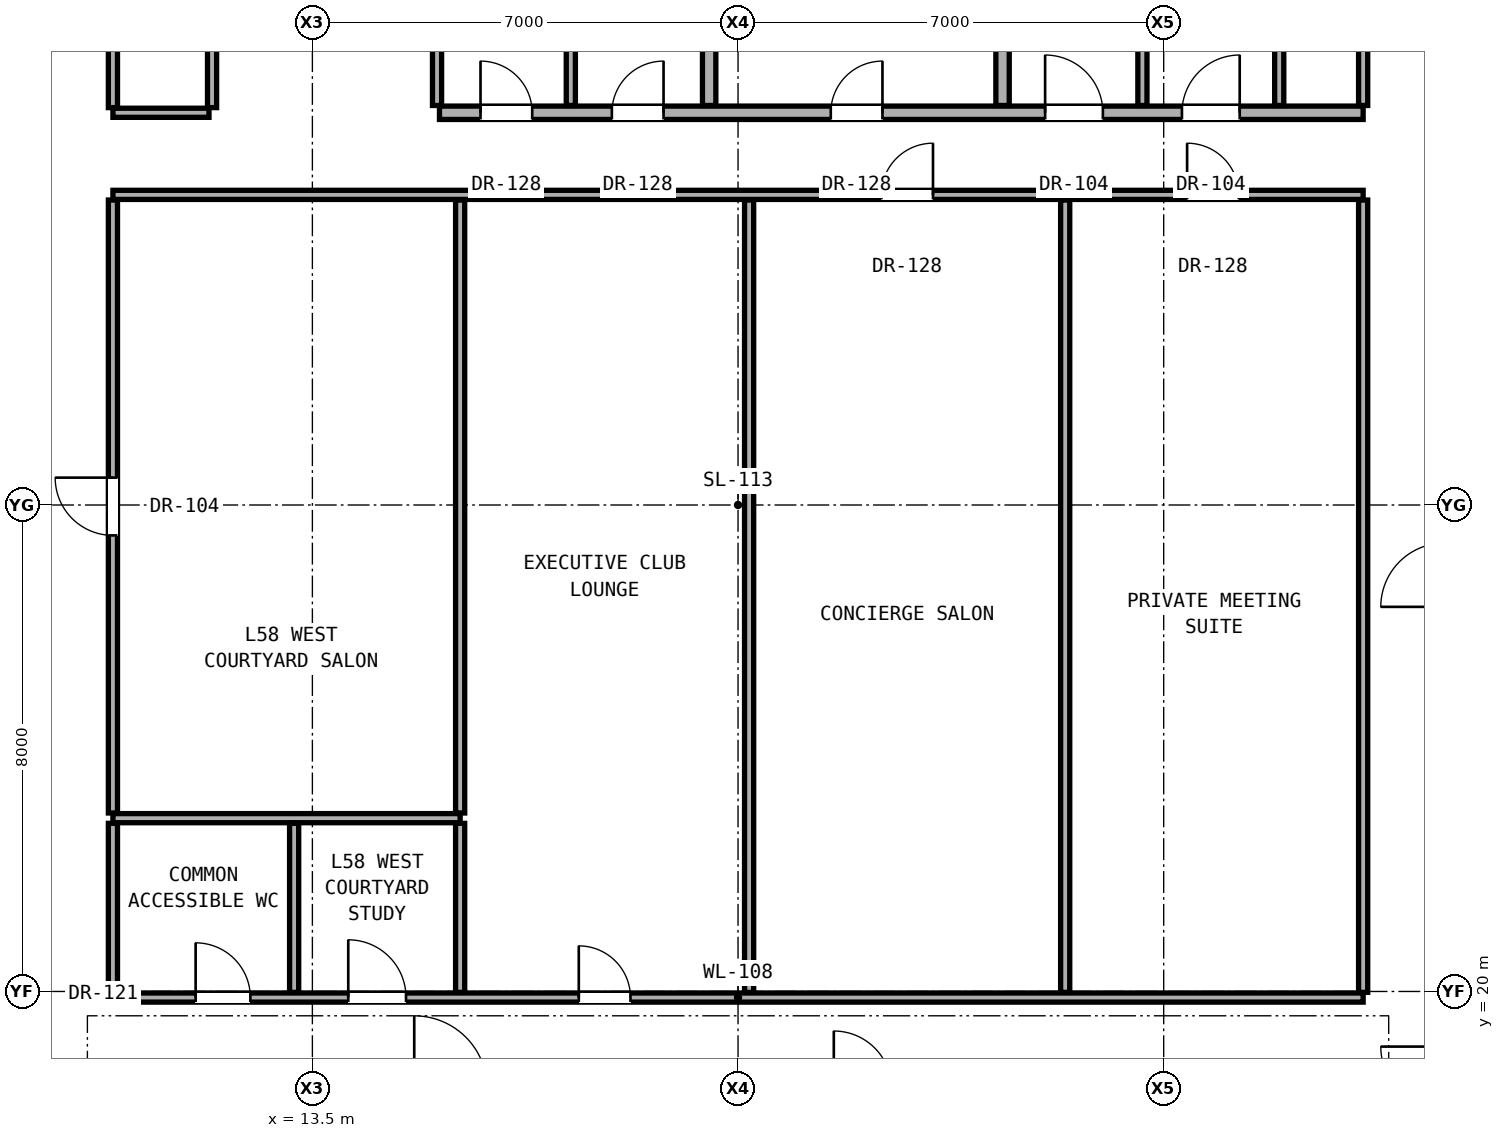
"""IFC4 building model, lengths in metres.
Left out: names, types, materials, properties, quantities, classifications, styles, units other than length and angle.
Written with IfcOpenShell. Run it as: python <this file> out.ifc"""

import sys

from ifc_helpers import new_model, si_unit, direction, frame, frame_2d, origin, place, context, subcontext, project, spatial, rectangle, extrude, element, fill, save


model = new_model("IFC4")
c1 = context("Model", 3, precision=1e-05, world=origin(), true_north=direction((0.0, 1.0)))
c2 = subcontext(c1, "Body", "Model", "MODEL_VIEW")
j1 = project(units=[si_unit("LENGTHUNIT", "METRE"), si_unit("PLANEANGLEUNIT", "RADIAN")], contexts=[c1])
p1 = place(None, origin())
s1 = spatial("IfcSite", under=j1, at=p1, CompositionType="ELEMENT")
p2 = place(p1, origin())
s2 = spatial("IfcBuilding", under=s1, at=p2, CompositionType="ELEMENT")
p3 = place(p2, frame((0.0, 0.0, 203.15)))
s3 = spatial("IfcBuildingStorey", under=s2, at=p3, CompositionType="ELEMENT", Elevation=203.15)
p4 = place(p3, frame((10.22, 19.9, 0.0), z_axis=(0.0, 0.0, 1.0), x_axis=(1.0, 0.0, 0.0)))
e1 = element("IfcWall", 1, at=p4, inside=s3, PredefinedType="PARTITIONING", context=c2, shape_type="SweptSolid", body=[
    extrude(rectangle(XDim=20.56, YDim=0.15, at=frame_2d((10.28, 0.0))), origin(), (0.0, 0.0, 1.0), 2.186),
])
p5 = place(p4, frame((1.36, 0.0, 0.0)))
e2 = element("IfcOpeningElement", 2, at=p5, cuts=e1, PredefinedType="OPENING", context=c2, shape_type="SweptSolid", body=[
    extrude(rectangle(XDim=0.9, YDim=2.1, at=frame_2d((0.45, 1.05))), frame((0.0, 0.085, 0.0), z_axis=(0.0, -1.0, 0.0), x_axis=(1.0, 0.0, 0.0)), (0.0, 0.0, 1.0), 0.17),
])
p6 = place(p4, frame((3.87, 0.0, 0.0)))
e3 = element("IfcOpeningElement", 3, at=p6, cuts=e1, PredefinedType="OPENING", context=c2, shape_type="SweptSolid", body=[
    extrude(rectangle(XDim=0.95, YDim=2.15, at=frame_2d((0.475, 1.075))), frame((0.0, 0.085, 0.0), z_axis=(0.0, -1.0, 0.0), x_axis=(1.0, 0.0, 0.0)), (0.0, 0.0, 1.0), 0.17),
])
p7 = place(p4, frame((7.661, 0.0, 0.0)))
e4 = element("IfcOpeningElement", 4, at=p7, cuts=e1, PredefinedType="OPENING", context=c2, shape_type="SweptSolid", body=[
    extrude(rectangle(XDim=0.85, YDim=2.01, at=frame_2d((0.425, 1.005))), frame((0.0, 0.085, 0.0), z_axis=(0.0, -1.0, 0.0), x_axis=(1.0, 0.0, 0.0)), (0.0, 0.0, 1.0), 0.17),
])
p8 = place(p3, frame((10.22, 22.85, 0.0), z_axis=(0.0, 0.0, 1.0), x_axis=(1.0, 0.0, 0.0)))
e5 = element("IfcWall", 5, at=p8, inside=s3, PredefinedType="PARTITIONING", context=c2, shape_type="SweptSolid", body=[
    extrude(rectangle(XDim=5.71, YDim=0.15, at=frame_2d((2.855, 0.0))), origin(), (0.0, 0.0, 1.0), 2.186),
])
p9 = place(p3, frame((10.22, 33.1, 0.0), z_axis=(0.0, 0.0, 1.0), x_axis=(1.0, 0.0, 0.0)))
e6 = element("IfcWall", 6, at=p9, inside=s3, PredefinedType="PARTITIONING", context=c2, shape_type="SweptSolid", body=[
    extrude(rectangle(XDim=20.56, YDim=0.15, at=frame_2d((10.28, 0.0))), origin(), (0.0, 0.0, 1.0), 2.186),
])
p10 = place(p9, frame((12.636, 0.0, 0.0)))
e7 = element("IfcOpeningElement", 7, at=p10, cuts=e6, PredefinedType="OPENING", context=c2, shape_type="SweptSolid", body=[
    extrude(rectangle(XDim=0.85, YDim=2.01, at=frame_2d((0.425, 1.005))), frame((0.0, 0.085, 0.0), z_axis=(0.0, -1.0, 0.0), x_axis=(1.0, 0.0, 0.0)), (0.0, 0.0, 1.0), 0.17),
])
p11 = place(p9, frame((17.665, 0.0, 0.0)))
e8 = element("IfcOpeningElement", 8, at=p11, cuts=e6, PredefinedType="OPENING", context=c2, shape_type="SweptSolid", body=[
    extrude(rectangle(XDim=0.85, YDim=2.01, at=frame_2d((0.425, 1.005))), frame((0.0, 0.085, 0.0), z_axis=(0.0, -1.0, 0.0), x_axis=(1.0, 0.0, 0.0)), (0.0, 0.0, 1.0), 0.17),
])
p12 = place(p3, frame((10.22, 34.45, 0.0), z_axis=(0.0, 0.0, 1.0), x_axis=(1.0, 0.0, 0.0)))
e9 = element("IfcWall", 9, at=p12, inside=s3, PredefinedType="PARTITIONING", context=c2, shape_type="SweptSolid", body=[
    extrude(rectangle(XDim=1.58, YDim=0.15, at=frame_2d((0.79, 0.0))), origin(), (0.0, 0.0, 1.0), 2.186),
])
p13 = place(p3, frame((15.59, 34.45, 0.0), z_axis=(0.0, 0.0, 1.0), x_axis=(1.0, 0.0, 0.0)))
e10 = element("IfcWall", 10, at=p13, inside=s3, PredefinedType="SOLIDWALL", context=c2, shape_type="SweptSolid", body=[
    extrude(rectangle(XDim=15.19, YDim=0.22, at=frame_2d((7.595, 0.0))), origin(), (0.0, 0.0, 1.0), 2.186),
])
p14 = place(p13, frame((6.435, 0.0, 0.0)))
e11 = element("IfcOpeningElement", 11, at=p14, cuts=e10, PredefinedType="OPENING", context=c2, shape_type="SweptSolid", body=[
    extrude(rectangle(XDim=0.85, YDim=2.01, at=frame_2d((0.425, 1.005))), frame((0.0, 0.12, 0.0), z_axis=(0.0, -1.0, 0.0), x_axis=(1.0, 0.0, 0.0)), (0.0, 0.0, 1.0), 0.24),
])
p15 = place(p13, frame((9.96, 0.0, 0.0)))
e12 = element("IfcOpeningElement", 12, at=p15, cuts=e10, PredefinedType="OPENING", context=c2, shape_type="SweptSolid", body=[
    extrude(rectangle(XDim=0.95, YDim=2.15, at=frame_2d((0.475, 1.075))), frame((0.0, 0.12, 0.0), z_axis=(0.0, -1.0, 0.0), x_axis=(1.0, 0.0, 0.0)), (0.0, 0.0, 1.0), 0.24),
])
p16 = place(p13, frame((12.21, 0.0, 0.0)))
e13 = element("IfcOpeningElement", 13, at=p16, cuts=e10, PredefinedType="OPENING", context=c2, shape_type="SweptSolid", body=[
    extrude(rectangle(XDim=0.95, YDim=2.15, at=frame_2d((0.475, 1.075))), frame((0.0, 0.12, 0.0), z_axis=(0.0, -1.0, 0.0), x_axis=(1.0, 0.0, 0.0)), (0.0, 0.0, 1.0), 0.24),
])
p17 = place(p13, frame((0.675, 0.0, 0.0)))
e14 = element("IfcOpeningElement", 14, at=p17, cuts=e10, PredefinedType="OPENING", context=c2, shape_type="SweptSolid", body=[
    extrude(rectangle(XDim=0.85, YDim=2.01, at=frame_2d((0.425, 1.005))), frame((0.0, 0.12, 0.0), z_axis=(0.0, -1.0, 0.0), x_axis=(1.0, 0.0, 0.0)), (0.0, 0.0, 1.0), 0.24),
])
p18 = place(p13, frame((2.835, 0.0, 0.0)))
e15 = element("IfcOpeningElement", 15, at=p18, cuts=e10, PredefinedType="OPENING", context=c2, shape_type="SweptSolid", body=[
    extrude(rectangle(XDim=0.85, YDim=2.01, at=frame_2d((0.425, 1.005))), frame((0.0, 0.12, 0.0), z_axis=(0.0, -1.0, 0.0), x_axis=(1.0, 0.0, 0.0)), (0.0, 0.0, 1.0), 0.24),
])
p19 = place(p3, frame((10.22, 19.985, 0.0), z_axis=(0.0, 0.0, 1.0), x_axis=(0.0, 1.0, 0.0)))
e16 = element("IfcWall", 16, at=p19, inside=s3, PredefinedType="PARTITIONING", context=c2, shape_type="SweptSolid", body=[
    extrude(rectangle(XDim=2.78, YDim=0.15, at=frame_2d((1.39, 0.0))), origin(), (0.0, 0.0, 1.0), 3.05),
])
p20 = place(p3, frame((10.22, 22.935, 0.0), z_axis=(0.0, 0.0, 1.0), x_axis=(0.0, 1.0, 0.0)))
e17 = element("IfcWall", 17, at=p20, inside=s3, PredefinedType="PARTITIONING", context=c2, shape_type="SweptSolid", body=[
    extrude(rectangle(XDim=10.08, YDim=0.15, at=frame_2d((5.04, 0.0))), origin(), (0.0, 0.0, 1.0), 2.346),
])
p21 = place(p20, frame((4.565, 0.0, 0.0)))
e18 = element("IfcOpeningElement", 18, at=p21, cuts=e17, PredefinedType="OPENING", context=c2, shape_type="SweptSolid", body=[
    extrude(rectangle(XDim=0.95, YDim=2.15, at=frame_2d((0.475, 1.075))), frame((0.0, 0.085, 0.0), z_axis=(0.0, -1.0, 0.0), x_axis=(1.0, 0.0, 0.0)), (0.0, 0.0, 1.0), 0.17),
])
p22 = place(p3, frame((10.22, 34.535, 0.0), z_axis=(0.0, 0.0, 1.0), x_axis=(0.0, 1.0, 0.0)))
e19 = element("IfcWall", 19, at=p22, inside=s3, PredefinedType="PARTITIONING", context=c2, shape_type="SweptSolid", body=[
    extrude(rectangle(XDim=9.13, YDim=0.15, at=frame_2d((4.565, 0.0))), origin(), (0.0, 0.0, 1.0), 2.442),
])
p23 = place(p3, frame((11.85, 34.535, 0.0), z_axis=(0.0, 0.0, 1.0), x_axis=(0.0, 1.0, 0.0)))
e20 = element("IfcWall", 20, at=p23, inside=s3, PredefinedType="PARTITIONING", context=c2, shape_type="SweptSolid", body=[
    extrude(rectangle(XDim=2.795, YDim=0.15, at=frame_2d((1.397, 0.0))), origin(), (0.0, 0.0, 1.0), 3.05),
])
p24 = place(p3, frame((13.2, 19.985, 0.0), z_axis=(0.0, 0.0, 1.0), x_axis=(0.0, 1.0, 0.0)))
e21 = element("IfcWall", 21, at=p24, inside=s3, PredefinedType="PARTITIONING", context=c2, shape_type="SweptSolid", body=[
    extrude(rectangle(XDim=2.78, YDim=0.15, at=frame_2d((1.39, 0.0))), origin(), (0.0, 0.0, 1.0), 3.05),
])
p25 = place(p3, frame((15.55, 34.57, 0.0), z_axis=(0.0, 0.0, 1.0), x_axis=(0.0, 1.0, 0.0)))
e22 = element("IfcWall", 22, at=p25, inside=s3, PredefinedType="PARTITIONING", context=c2, shape_type="SweptSolid", body=[
    extrude(rectangle(XDim=2.76, YDim=0.15, at=frame_2d((1.38, 0.0))), origin(), (0.0, 0.0, 1.0), 3.05),
])
p26 = place(p3, frame((15.93, 19.985, 0.0), z_axis=(0.0, 0.0, 1.0), x_axis=(0.0, 1.0, 0.0)))
e23 = element("IfcWall", 23, at=p26, inside=s3, PredefinedType="PARTITIONING", context=c2, shape_type="SweptSolid", body=[
    extrude(rectangle(XDim=2.78, YDim=0.15, at=frame_2d((1.39, 0.0))), origin(), (0.0, 0.0, 1.0), 3.05),
])
p27 = place(p3, frame((15.93, 22.935, 0.0), z_axis=(0.0, 0.0, 1.0), x_axis=(0.0, 1.0, 0.0)))
e24 = element("IfcWall", 24, at=p27, inside=s3, PredefinedType="PARTITIONING", context=c2, shape_type="SweptSolid", body=[
    extrude(rectangle(XDim=10.08, YDim=0.15, at=frame_2d((5.04, 0.0))), origin(), (0.0, 0.0, 1.0), 2.186),
])
p28 = place(p3, frame((17.75, 34.57, 0.0), z_axis=(0.0, 0.0, 1.0), x_axis=(0.0, 1.0, 0.0)))
e25 = element("IfcWall", 25, at=p28, inside=s3, PredefinedType="PARTITIONING", context=c2, shape_type="SweptSolid", body=[
    extrude(rectangle(XDim=2.76, YDim=0.15, at=frame_2d((1.38, 0.0))), origin(), (0.0, 0.0, 1.0), 3.05),
])
p29 = place(p3, frame((20.025, 34.57, 0.0), z_axis=(0.0, 0.0, 1.0), x_axis=(0.0, 1.0, 0.0)))
e26 = element("IfcWall", 26, at=p29, inside=s3, PredefinedType="SOLIDWALL", context=c2, shape_type="SweptSolid", body=[
    extrude(rectangle(XDim=2.76, YDim=0.22, at=frame_2d((1.38, 0.0))), origin(), (0.0, 0.0, 1.0), 3.05),
])
p30 = place(p3, frame((20.682, 19.985, 0.0), z_axis=(0.0, 0.0, 1.0), x_axis=(0.0, 1.0, 0.0)))
e27 = element("IfcWall", 27, at=p30, inside=s3, PredefinedType="PARTITIONING", context=c2, shape_type="SweptSolid", body=[
    extrude(rectangle(XDim=13.03, YDim=0.15, at=frame_2d((6.515, 0.0))), origin(), (0.0, 0.0, 1.0), 2.186),
])
p31 = place(p3, frame((24.85, 34.57, 0.0), z_axis=(0.0, 0.0, 1.0), x_axis=(0.0, 1.0, 0.0)))
e28 = element("IfcWall", 28, at=p31, inside=s3, PredefinedType="SOLIDWALL", context=c2, shape_type="SweptSolid", body=[
    extrude(rectangle(XDim=2.76, YDim=0.22, at=frame_2d((1.38, 0.0))), origin(), (0.0, 0.0, 1.0), 3.05),
])
p32 = place(p3, frame((25.88, 19.985, 0.0), z_axis=(0.0, 0.0, 1.0), x_axis=(0.0, 1.0, 0.0)))
e29 = element("IfcWall", 29, at=p32, inside=s3, PredefinedType="PARTITIONING", context=c2, shape_type="SweptSolid", body=[
    extrude(rectangle(XDim=13.03, YDim=0.15, at=frame_2d((6.515, 0.0))), origin(), (0.0, 0.0, 1.0), 2.186),
])
for number, where, z_axis, x_axis in (
    (30, (27.15, 34.57, 0.0), (0.0, 0.0, 1.0), (0.0, 1.0, 0.0)),
    (31, (29.4, 34.57, 0.0), (0.0, 0.0, 1.0), (0.0, 1.0, 0.0)),
):
    element("IfcWall", number, at=place(p3, frame(where, z_axis=z_axis, x_axis=x_axis)), inside=s3, PredefinedType="PARTITIONING", context=c2, shape_type="SweptSolid", body=[
        extrude(rectangle(XDim=2.76, YDim=0.15, at=frame_2d((1.38, 0.0))), origin(), (0.0, 0.0, 1.0), 3.05),
    ])
p33 = place(p3, frame((30.78, 19.985, 0.0), z_axis=(0.0, 0.0, 1.0), x_axis=(0.0, 1.0, 0.0)))
e32 = element("IfcWall", 32, at=p33, inside=s3, PredefinedType="PARTITIONING", context=c2, shape_type="SweptSolid", body=[
    extrude(rectangle(XDim=13.03, YDim=0.15, at=frame_2d((6.515, 0.0))), origin(), (0.0, 0.0, 1.0), 2.346),
])
p34 = place(p3, frame((30.78, 34.57, 0.0), z_axis=(0.0, 0.0, 1.0), x_axis=(0.0, 1.0, 0.0)))
e33 = element("IfcWall", 33, at=p34, inside=s3, PredefinedType="PARTITIONING", context=c2, shape_type="SweptSolid", body=[
    extrude(rectangle(XDim=9.095, YDim=0.15, at=frame_2d((4.547, 0.0))), origin(), (0.0, 0.0, 1.0), 2.442),
])
p35 = place(p14, origin())
e34 = element("IfcDoor", 34, at=p35, inside=s3, OperationType="SINGLE_SWING_RIGHT", PredefinedType="DOOR", context=c2, shape_type="SweptSolid", body=[
    extrude(rectangle(XDim=0.85, YDim=2.01, at=frame_2d((0.425, 1.005))), frame((0.0, 0.025, 0.0), z_axis=(0.0, -1.0, 0.0), x_axis=(1.0, 0.0, 0.0)), (0.0, 0.0, 1.0), 0.05),
])
fill(e11, e34)
p36 = place(p15, origin())
e35 = element("IfcDoor", 35, at=p36, inside=s3, OperationType="SINGLE_SWING_LEFT", PredefinedType="DOOR", context=c2, shape_type="SweptSolid", body=[
    extrude(rectangle(XDim=0.95, YDim=2.15, at=frame_2d((0.475, 1.075))), frame((0.0, 0.025, 0.0), z_axis=(0.0, -1.0, 0.0), x_axis=(1.0, 0.0, 0.0)), (0.0, 0.0, 1.0), 0.05),
])
fill(e12, e35)
p37 = place(p16, origin())
e36 = element("IfcDoor", 36, at=p37, inside=s3, OperationType="SINGLE_SWING_RIGHT", PredefinedType="DOOR", context=c2, shape_type="SweptSolid", body=[
    extrude(rectangle(XDim=0.95, YDim=2.15, at=frame_2d((0.475, 1.075))), frame((0.0, 0.025, 0.0), z_axis=(0.0, -1.0, 0.0), x_axis=(1.0, 0.0, 0.0)), (0.0, 0.0, 1.0), 0.05),
])
fill(e13, e36)
p38 = place(p17, origin())
e37 = element("IfcDoor", 37, at=p38, inside=s3, OperationType="SINGLE_SWING_LEFT", PredefinedType="DOOR", context=c2, shape_type="SweptSolid", body=[
    extrude(rectangle(XDim=0.85, YDim=2.01, at=frame_2d((0.425, 1.005))), frame((0.0, 0.025, 0.0), z_axis=(0.0, -1.0, 0.0), x_axis=(1.0, 0.0, 0.0)), (0.0, 0.0, 1.0), 0.05),
])
fill(e14, e37)
p39 = place(p18, origin())
e38 = element("IfcDoor", 38, at=p39, inside=s3, OperationType="SINGLE_SWING_RIGHT", PredefinedType="DOOR", context=c2, shape_type="SweptSolid", body=[
    extrude(rectangle(XDim=0.85, YDim=2.01, at=frame_2d((0.425, 1.005))), frame((0.0, 0.025, 0.0), z_axis=(0.0, -1.0, 0.0), x_axis=(1.0, 0.0, 0.0)), (0.0, 0.0, 1.0), 0.05),
])
fill(e15, e38)
p40 = place(p5, origin())
e39 = element("IfcDoor", 39, at=p40, inside=s3, OperationType="SINGLE_SWING_LEFT", PredefinedType="DOOR", context=c2, shape_type="SweptSolid", body=[
    extrude(rectangle(XDim=0.9, YDim=2.1, at=frame_2d((0.45, 1.05))), frame((0.0, 0.025, 0.0), z_axis=(0.0, -1.0, 0.0), x_axis=(1.0, 0.0, 0.0)), (0.0, 0.0, 1.0), 0.05),
])
fill(e2, e39)
p41 = place(p6, origin())
e40 = element("IfcDoor", 40, at=p41, inside=s3, OperationType="SINGLE_SWING_LEFT", PredefinedType="DOOR", context=c2, shape_type="SweptSolid", body=[
    extrude(rectangle(XDim=0.95, YDim=2.15, at=frame_2d((0.475, 1.075))), frame((0.0, 0.025, 0.0), z_axis=(0.0, -1.0, 0.0), x_axis=(1.0, 0.0, 0.0)), (0.0, 0.0, 1.0), 0.05),
])
fill(e3, e40)
p42 = place(p21, origin())
e41 = element("IfcDoor", 41, at=p42, inside=s3, OperationType="SINGLE_SWING_RIGHT", PredefinedType="DOOR", context=c2, shape_type="SweptSolid", body=[
    extrude(rectangle(XDim=0.95, YDim=2.15, at=frame_2d((0.475, 1.075))), frame((0.0, 0.025, 0.0), z_axis=(0.0, -1.0, 0.0), x_axis=(1.0, 0.0, 0.0)), (0.0, 0.0, 1.0), 0.05),
])
fill(e18, e41)
p43 = place(p7, origin())
e42 = element("IfcDoor", 42, at=p43, inside=s3, OperationType="SINGLE_SWING_LEFT", PredefinedType="DOOR", context=c2, shape_type="SweptSolid", body=[
    extrude(rectangle(XDim=0.85, YDim=2.01, at=frame_2d((0.425, 1.005))), frame((0.0, 0.025, 0.0), z_axis=(0.0, -1.0, 0.0), x_axis=(1.0, 0.0, 0.0)), (0.0, 0.0, 1.0), 0.05),
])
fill(e4, e42)
p44 = place(p10, origin())
e43 = element("IfcDoor", 43, at=p44, inside=s3, OperationType="SINGLE_SWING_RIGHT", PredefinedType="DOOR", context=c2, shape_type="SweptSolid", body=[
    extrude(rectangle(XDim=0.85, YDim=2.01, at=frame_2d((0.425, 1.005))), frame((0.0, 0.025, 0.0), z_axis=(0.0, -1.0, 0.0), x_axis=(1.0, 0.0, 0.0)), (0.0, 0.0, 1.0), 0.05),
])
fill(e7, e43)
p45 = place(p11, origin())
e44 = element("IfcDoor", 44, at=p45, inside=s3, OperationType="SINGLE_SWING_LEFT", PredefinedType="DOOR", context=c2, shape_type="SweptSolid", body=[
    extrude(rectangle(XDim=0.85, YDim=2.01, at=frame_2d((0.425, 1.005))), frame((0.0, 0.025, 0.0), z_axis=(0.0, -1.0, 0.0), x_axis=(1.0, 0.0, 0.0)), (0.0, 0.0, 1.0), 0.05),
])
fill(e8, e44)
save(model, sys.argv[1])
